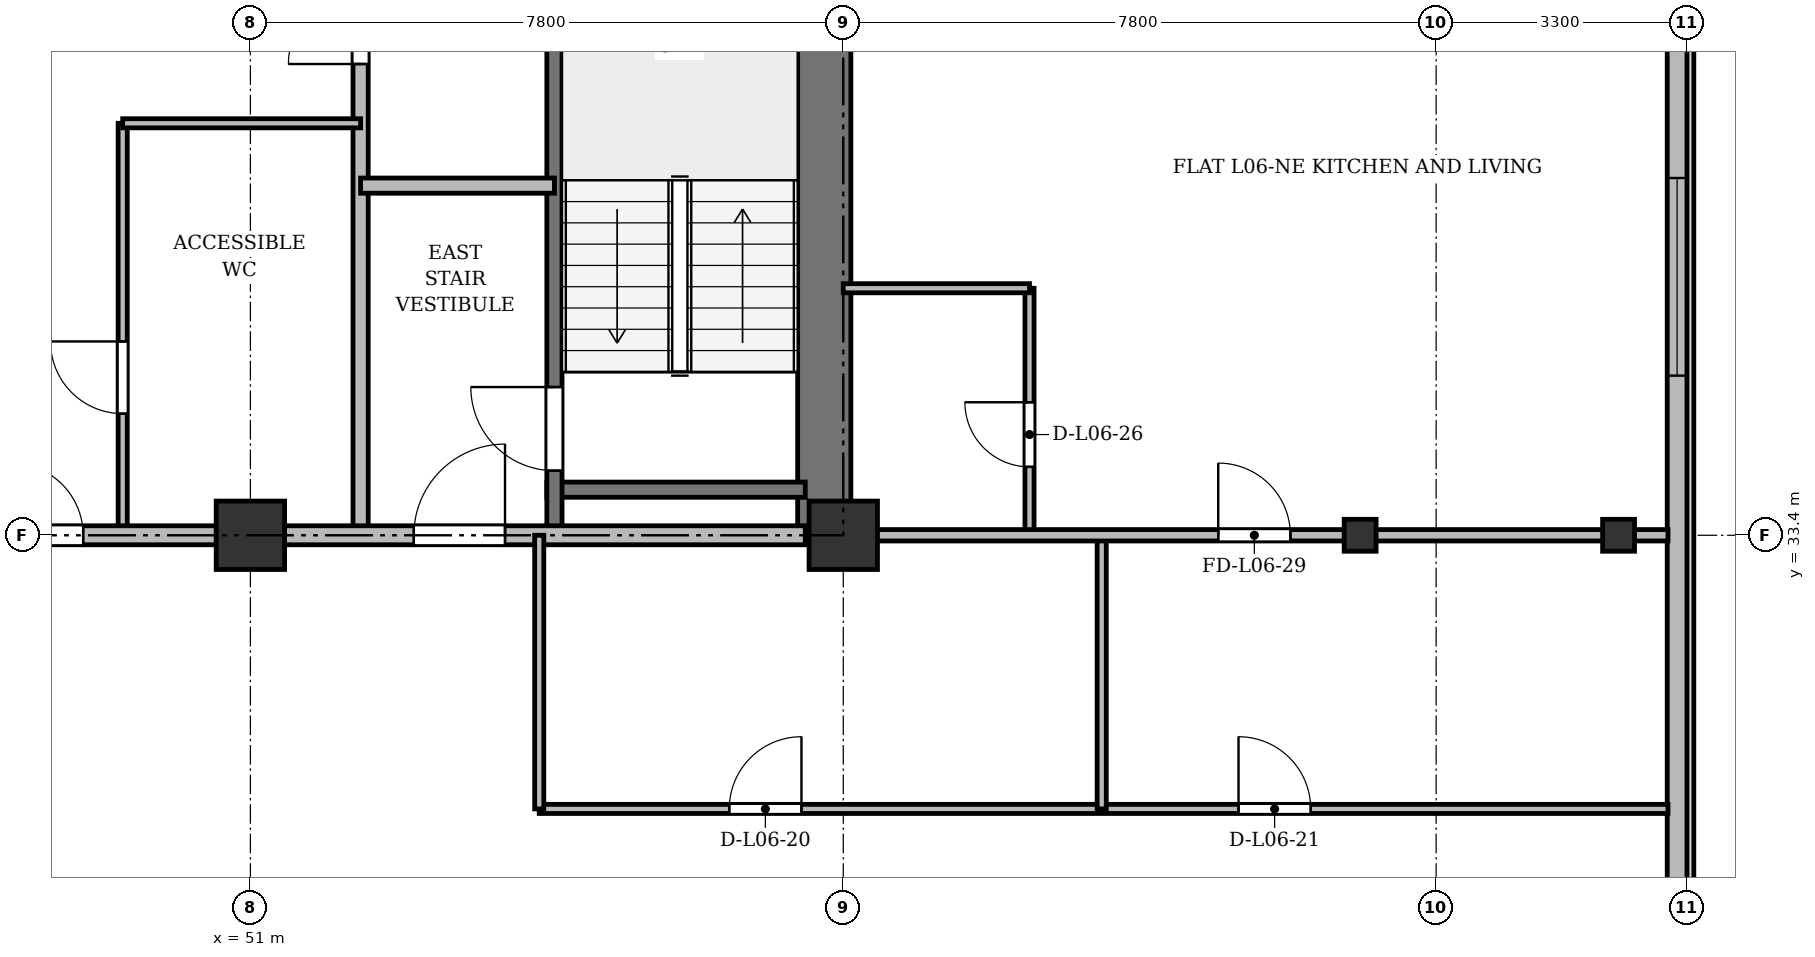
"""IFC4 building model, lengths in metres.
Left out: names, types, materials, properties, quantities, classifications, styles, units other than length and angle.
Written with IfcOpenShell. Run it as: python <this file> out.ifc"""

import sys

from ifc_helpers import new_model, si_unit, direction, frame, frame_2d, origin, origin_2d, place, context, subcontext, project, spatial, rectangle, i_section, extrude, source, transform, mapped, element, fill, save


model = new_model("IFC4")
c1 = context("Model", 3, precision=1e-05, world=origin(), true_north=direction((0.0, 1.0)))
c2 = subcontext(c1, "Body", "Model", "MODEL_VIEW")
j1 = project(units=[si_unit("LENGTHUNIT", "METRE"), si_unit("PLANEANGLEUNIT", "RADIAN")], contexts=[c1])
p1 = place(None, origin())
s1 = spatial("IfcSite", under=j1, at=p1, CompositionType="ELEMENT")
p2 = place(p1, origin())
s2 = spatial("IfcBuilding", under=s1, at=p2, CompositionType="ELEMENT")
p3 = place(p2, frame((0.0, 0.0, 27.1)))
s3 = spatial("IfcBuildingStorey", under=s2, at=p3, CompositionType="ELEMENT", Elevation=27.1)
m1 = source(origin(), c2, "Body", "SweptSolid", [
    extrude(rectangle(XDim=0.9, YDim=0.9, at=origin_2d()), origin(), (0.0, 0.0, 1.0), 3.6),
])
for number, where, z_axis, x_axis in (
    (1, (51.0, 33.4, 0.0), (0.0, 0.0, 1.0), (1.0, 0.0, 0.0)),
    (2, (58.8, 33.4, 0.0), (0.0, 0.0, 1.0), (1.0, 0.0, 0.0)),
):
    element("IfcColumn", number, at=place(p3, frame(where, z_axis=z_axis, x_axis=x_axis)), inside=s3, PredefinedType="COLUMN", context=c2, shape_type="MappedRepresentation", body=[
        mapped(m1, transform((0.0, 0.0, 0.0), x_axis=(1.0, 0.0, 0.0), y_axis=(0.0, 1.0, 0.0), z_axis=(0.0, 0.0, 1.0), scale=1.0)),
    ])
m2 = source(origin(), c2, "Body", "SweptSolid", [
    extrude(i_section(OverallWidth=0.42, OverallDepth=0.42, WebThickness=0.026, FlangeThickness=0.04, at=origin_2d()), origin(), (0.0, 0.0, 1.0), 3.6),
])
for number, where, z_axis, x_axis in (
    (3, (65.6, 33.4, 0.0), (0.0, 0.0, 1.0), (1.0, 0.0, 0.0)),
    (4, (69.0, 33.4, 0.0), (0.0, 0.0, 1.0), (1.0, 0.0, 0.0)),
):
    element("IfcColumn", number, at=place(p3, frame(where, z_axis=z_axis, x_axis=x_axis)), inside=s3, PredefinedType="COLUMN", context=c2, shape_type="MappedRepresentation", body=[
        mapped(m2, transform((0.0, 0.0, 0.0), x_axis=(1.0, 0.0, 0.0), y_axis=(0.0, 1.0, 0.0), z_axis=(0.0, 0.0, 1.0), scale=1.0)),
    ])
p4 = place(p3, frame((69.77, 45.5, 0.0), z_axis=(0.0, 0.0, 1.0), x_axis=(0.0, -1.0, 0.0)))
e5 = element("IfcWall", 5, at=p4, inside=s3, PredefinedType="SOLIDWALL", context=c2, shape_type="SweptSolid", body=[
    extrude(rectangle(XDim=39.6, YDim=0.26, at=frame_2d((19.8, 0.0))), origin(), (0.0, 0.0, 1.0), 3.34),
])
p5 = place(p4, frame((36.95, 0.0, 0.92)))
e6 = element("IfcOpeningElement", 6, at=p5, cuts=e5, PredefinedType="OPENING", context=c2, shape_type="SweptSolid", body=[
    extrude(rectangle(XDim=1.2, YDim=1.65, at=frame_2d((0.6, 0.825))), frame((0.0, 0.14, 0.0), z_axis=(0.0, -1.0, 0.0), x_axis=(1.0, 0.0, 0.0)), (0.0, 0.0, 1.0), 0.28),
])
p6 = place(p4, frame((32.8, 0.0, 0.92)))
e7 = element("IfcOpeningElement", 7, at=p6, cuts=e5, PredefinedType="OPENING", context=c2, shape_type="SweptSolid", body=[
    extrude(rectangle(XDim=2.6, YDim=1.9, at=frame_2d((1.3, 0.95))), frame((0.0, 0.14, 0.0), z_axis=(0.0, -1.0, 0.0), x_axis=(1.0, 0.0, 0.0)), (0.0, 0.0, 1.0), 0.28),
])
p7 = place(p4, frame((28.6, 0.0, 0.92)))
e8 = element("IfcOpeningElement", 8, at=p7, cuts=e5, PredefinedType="OPENING", context=c2, shape_type="SweptSolid", body=[
    extrude(rectangle(XDim=2.6, YDim=1.9, at=frame_2d((1.3, 0.95))), frame((0.0, 0.14, 0.0), z_axis=(0.0, -1.0, 0.0), x_axis=(1.0, 0.0, 0.0)), (0.0, 0.0, 1.0), 0.28),
])
p8 = place(p4, frame((7.4, 0.0, 0.92)))
e9 = element("IfcOpeningElement", 9, at=p8, cuts=e5, PredefinedType="OPENING", context=c2, shape_type="SweptSolid", body=[
    extrude(rectangle(XDim=2.6, YDim=1.9, at=frame_2d((1.3, 0.95))), frame((0.0, 0.14, 0.0), z_axis=(0.0, -1.0, 0.0), x_axis=(1.0, 0.0, 0.0)), (0.0, 0.0, 1.0), 0.28),
])
p9 = place(p4, frame((4.5, 0.0, 0.92)))
e10 = element("IfcOpeningElement", 10, at=p9, cuts=e5, PredefinedType="OPENING", context=c2, shape_type="SweptSolid", body=[
    extrude(rectangle(XDim=1.2, YDim=1.65, at=frame_2d((0.6, 0.825))), frame((0.0, 0.14, 0.0), z_axis=(0.0, -1.0, 0.0), x_axis=(1.0, 0.0, 0.0)), (0.0, 0.0, 1.0), 0.28),
])
p10 = place(p4, frame((1.15, 0.0, 0.92)))
e11 = element("IfcOpeningElement", 11, at=p10, cuts=e5, PredefinedType="OPENING", context=c2, shape_type="SweptSolid", body=[
    extrude(rectangle(XDim=1.2, YDim=1.65, at=frame_2d((0.6, 0.825))), frame((0.0, 0.14, 0.0), z_axis=(0.0, -1.0, 0.0), x_axis=(1.0, 0.0, 0.0)), (0.0, 0.0, 1.0), 0.28),
])
p11 = place(p3, frame((58.55, 33.4, 0.0), z_axis=(0.0, 0.0, 1.0), x_axis=(0.0, 1.0, 0.0)))
e12 = element("IfcWall", 12, at=p11, inside=s3, PredefinedType="SHEAR", context=c2, shape_type="SweptSolid", body=[
    extrude(rectangle(XDim=11.7, YDim=0.7, at=frame_2d((5.85, 0.0))), origin(), (0.0, 0.0, 1.0), 3.34),
])
p12 = place(p3, frame((54.9, 34.0, 0.0), z_axis=(0.0, 0.0, 1.0), x_axis=(1.0, 0.0, 0.0)))
e13 = element("IfcWall", 13, at=p12, inside=s3, PredefinedType="SHEAR", context=c2, shape_type="SweptSolid", body=[
    extrude(rectangle(XDim=3.4, YDim=0.2, at=frame_2d((1.7, 0.0))), origin(), (0.0, 0.0, 1.0), 3.34),
])
p13 = place(p3, frame((55.0, 33.4, 0.0), z_axis=(0.0, 0.0, 1.0), x_axis=(0.0, 1.0, 0.0)))
e14 = element("IfcWall", 14, at=p13, inside=s3, PredefinedType="SHEAR", context=c2, shape_type="SweptSolid", body=[
    extrude(rectangle(XDim=11.1, YDim=0.2, at=frame_2d((5.55, 0.0))), origin(), (0.0, 0.0, 1.0), 3.34),
])
p14 = place(p13, frame((0.85, 0.0, 0.0)))
e15 = element("IfcOpeningElement", 15, at=p14, cuts=e14, PredefinedType="OPENING", context=c2, shape_type="SweptSolid", body=[
    extrude(rectangle(XDim=1.1, YDim=2.15, at=frame_2d((0.55, 1.075))), frame((0.0, 0.11, 0.0), z_axis=(0.0, -1.0, 0.0), x_axis=(1.0, 0.0, 0.0)), (0.0, 0.0, 1.0), 0.22),
])
p15 = place(p3, frame((52.45, 33.4, 0.0), z_axis=(0.0, 0.0, 1.0), x_axis=(0.0, 1.0, 0.0)))
e16 = element("IfcWall", 16, at=p15, inside=s3, PredefinedType="PARTITIONING", context=c2, shape_type="SweptSolid", body=[
    extrude(rectangle(XDim=8.65, YDim=0.2, at=frame_2d((4.325, 0.0))), origin(), (0.0, 0.0, 1.0), 2.69),
])
p16 = place(p15, frame((6.2, 0.0, 0.0)))
e17 = element("IfcOpeningElement", 17, at=p16, cuts=e16, PredefinedType="OPENING", context=c2, shape_type="SweptSolid", body=[
    extrude(rectangle(XDim=0.95, YDim=2.15, at=frame_2d((0.475, 1.075))), frame((0.0, 0.11, 0.0), z_axis=(0.0, -1.0, 0.0), x_axis=(1.0, 0.0, 0.0)), (0.0, 0.0, 1.0), 0.22),
])
p17 = place(p3, frame((52.45, 38.0, 0.0), z_axis=(0.0, 0.0, 1.0), x_axis=(1.0, 0.0, 0.0)))
e18 = element("IfcWall", 18, at=p17, inside=s3, PredefinedType="PARTITIONING", context=c2, shape_type="SweptSolid", body=[
    extrude(rectangle(XDim=2.55, YDim=0.2, at=frame_2d((1.275, 0.0))), origin(), (0.0, 0.0, 1.0), 3.34),
])
p18 = place(p3, frame((49.32, 33.4, 0.0), z_axis=(0.0, 0.0, 1.0), x_axis=(0.0, 1.0, 0.0)))
e19 = element("IfcWall", 19, at=p18, inside=s3, PredefinedType="PARTITIONING", context=c2, shape_type="SweptSolid", body=[
    extrude(rectangle(XDim=5.42, YDim=0.12, at=frame_2d((2.71, 0.0))), origin(), (0.0, 0.0, 1.0), 2.69),
])
p19 = place(p18, frame((1.6, 0.0, 0.0)))
e20 = element("IfcOpeningElement", 20, at=p19, cuts=e19, PredefinedType="OPENING", context=c2, shape_type="SweptSolid", body=[
    extrude(rectangle(XDim=0.95, YDim=2.15, at=frame_2d((0.475, 1.075))), frame((0.0, 0.07, 0.0), z_axis=(0.0, -1.0, 0.0), x_axis=(1.0, 0.0, 0.0)), (0.0, 0.0, 1.0), 0.14),
])
p20 = place(p3, frame((49.32, 38.82, 0.0), z_axis=(0.0, 0.0, 1.0), x_axis=(1.0, 0.0, 0.0)))
e21 = element("IfcWall", 21, at=p20, inside=s3, PredefinedType="PARTITIONING", context=c2, shape_type="SweptSolid", body=[
    extrude(rectangle(XDim=3.13, YDim=0.12, at=frame_2d((1.565, 0.0))), origin(), (0.0, 0.0, 1.0), 2.752),
])
p21 = place(p3, frame((47.15, 33.4, 0.0), z_axis=(0.0, 0.0, 1.0), x_axis=(1.0, 0.0, 0.0)))
e22 = element("IfcWall", 22, at=p21, inside=s3, PredefinedType="PARTITIONING", context=c2, shape_type="SweptSolid", body=[
    extrude(rectangle(XDim=11.15, YDim=0.25, at=frame_2d((5.575, 0.0))), origin(), (0.0, 0.0, 1.0), 2.69),
])
p22 = place(p21, frame((0.7, 0.0, 0.0)))
e23 = element("IfcOpeningElement", 23, at=p22, cuts=e22, PredefinedType="OPENING", context=c2, shape_type="SweptSolid", body=[
    extrude(rectangle(XDim=0.95, YDim=2.15, at=frame_2d((0.475, 1.075))), frame((0.0, 0.135, 0.0), z_axis=(0.0, -1.0, 0.0), x_axis=(1.0, 0.0, 0.0)), (0.0, 0.0, 1.0), 0.27),
])
p23 = place(p21, frame((6.0, 0.0, 0.0)))
e24 = element("IfcOpeningElement", 24, at=p23, cuts=e22, PredefinedType="OPENING", context=c2, shape_type="SweptSolid", body=[
    extrude(rectangle(XDim=1.2, YDim=2.15, at=frame_2d((0.6, 1.075))), frame((0.0, 0.135, 0.0), z_axis=(0.0, -1.0, 0.0), x_axis=(1.0, 0.0, 0.0)), (0.0, 0.0, 1.0), 0.27),
])
p24 = place(p3, frame((54.8, 29.8, 0.0), z_axis=(0.0, 0.0, 1.0), x_axis=(1.0, 0.0, 0.0)))
e25 = element("IfcWall", 25, at=p24, inside=s3, PredefinedType="PARTITIONING", context=c2, shape_type="SweptSolid", body=[
    extrude(rectangle(XDim=14.85, YDim=0.12, at=frame_2d((7.425, 0.0))), origin(), (0.0, 0.0, 1.0), 2.752),
])
p25 = place(p24, frame((2.5, 0.0, 0.0)))
e26 = element("IfcOpeningElement", 26, at=p25, cuts=e25, PredefinedType="OPENING", context=c2, shape_type="SweptSolid", body=[
    extrude(rectangle(XDim=0.95, YDim=2.15, at=frame_2d((0.475, 1.075))), frame((0.0, 0.07, 0.0), z_axis=(0.0, -1.0, 0.0), x_axis=(1.0, 0.0, 0.0)), (0.0, 0.0, 1.0), 0.14),
])
p26 = place(p24, frame((9.2, 0.0, 0.0)))
e27 = element("IfcOpeningElement", 27, at=p26, cuts=e25, PredefinedType="OPENING", context=c2, shape_type="SweptSolid", body=[
    extrude(rectangle(XDim=0.95, YDim=2.15, at=frame_2d((0.475, 1.075))), frame((0.0, 0.07, 0.0), z_axis=(0.0, -1.0, 0.0), x_axis=(1.0, 0.0, 0.0)), (0.0, 0.0, 1.0), 0.14),
])
for number, where, z_axis, x_axis in (
    (28, (62.2, 29.8, 0.0), (0.0, 0.0, 1.0), (0.0, 1.0, 0.0)),
    (29, (54.8, 29.8, 0.0), (0.0, 0.0, 1.0), (0.0, 1.0, 0.0)),
):
    element("IfcWall", number, at=place(p3, frame(where, z_axis=z_axis, x_axis=x_axis)), inside=s3, PredefinedType="PARTITIONING", context=c2, shape_type="SweptSolid", body=[
        extrude(rectangle(XDim=3.6, YDim=0.12, at=frame_2d((1.8, 0.0))), origin(), (0.0, 0.0, 1.0), 2.69),
    ])
p27 = place(p3, frame((61.25, 33.4, 0.0), z_axis=(0.0, 0.0, 1.0), x_axis=(0.0, 1.0, 0.0)))
e30 = element("IfcWall", 30, at=p27, inside=s3, PredefinedType="PARTITIONING", context=c2, shape_type="SweptSolid", body=[
    extrude(rectangle(XDim=3.25, YDim=0.12, at=frame_2d((1.625, 0.0))), origin(), (0.0, 0.0, 1.0), 2.69),
])
p28 = place(p27, frame((0.9, 0.0, 0.0)))
e31 = element("IfcOpeningElement", 31, at=p28, cuts=e30, PredefinedType="OPENING", context=c2, shape_type="SweptSolid", body=[
    extrude(rectangle(XDim=0.85, YDim=2.1, at=frame_2d((0.425, 1.05))), frame((0.0, 0.07, 0.0), z_axis=(0.0, -1.0, 0.0), x_axis=(1.0, 0.0, 0.0)), (0.0, 0.0, 1.0), 0.14),
])
p29 = place(p3, frame((58.8, 36.65, 0.0), z_axis=(0.0, 0.0, 1.0), x_axis=(1.0, 0.0, 0.0)))
e32 = element("IfcWall", 32, at=p29, inside=s3, PredefinedType="PARTITIONING", context=c2, shape_type="SweptSolid", body=[
    extrude(rectangle(XDim=2.45, YDim=0.12, at=frame_2d((1.225, 0.0))), origin(), (0.0, 0.0, 1.0), 2.752),
])
p30 = place(p3, frame((58.8, 33.4, 0.0), z_axis=(0.0, 0.0, 1.0), x_axis=(1.0, 0.0, 0.0)))
e33 = element("IfcWall", 33, at=p30, inside=s3, PredefinedType="PARTITIONING", context=c2, shape_type="SweptSolid", body=[
    extrude(rectangle(XDim=10.85, YDim=0.15, at=frame_2d((5.425, 0.0))), origin(), (0.0, 0.0, 1.0), 2.69),
])
p31 = place(p30, frame((4.933, 0.0, 0.0)))
e34 = element("IfcOpeningElement", 34, at=p31, cuts=e33, PredefinedType="OPENING", context=c2, shape_type="SweptSolid", body=[
    extrude(rectangle(XDim=0.95, YDim=2.15, at=frame_2d((0.475, 1.075))), frame((0.0, 0.085, 0.0), z_axis=(0.0, -1.0, 0.0), x_axis=(1.0, 0.0, 0.0)), (0.0, 0.0, 1.0), 0.17),
])
m3 = source(origin(), c2, "Body", "SweptSolid", [
    extrude(rectangle(XDim=2.6, YDim=1.9, at=frame_2d((1.3, 0.95))), frame((0.0, 0.03, 0.0), z_axis=(0.0, -1.0, 0.0), x_axis=(1.0, 0.0, 0.0)), (0.0, 0.0, 1.0), 0.06),
])
p32 = place(p8, origin())
e35 = element("IfcWindow", 35, at=p32, inside=s3, PartitioningType="SINGLE_PANEL", PredefinedType="WINDOW", context=c2, shape_type="MappedRepresentation", body=[
    mapped(m3, transform((0.0, 0.0, 0.0), x_axis=(1.0, 0.0, 0.0), y_axis=(0.0, 1.0, 0.0), z_axis=(0.0, 0.0, 1.0), scale=1.0)),
])
fill(e9, e35)
m4 = source(origin(), c2, "Body", "SweptSolid", [
    extrude(rectangle(XDim=1.1, YDim=2.15, at=frame_2d((0.55, 1.075))), frame((0.0, 0.025, 0.0), z_axis=(0.0, -1.0, 0.0), x_axis=(1.0, 0.0, 0.0)), (0.0, 0.0, 1.0), 0.05),
])
p33 = place(p14, origin())
e36 = element("IfcDoor", 36, at=p33, inside=s3, OperationType="SINGLE_SWING_RIGHT", PredefinedType="DOOR", context=c2, shape_type="MappedRepresentation", body=[
    mapped(m4, transform((0.0, 0.0, 0.0), x_axis=(1.0, 0.0, 0.0), y_axis=(0.0, 1.0, 0.0), z_axis=(0.0, 0.0, 1.0), scale=1.0)),
])
fill(e15, e36)
m5 = source(origin(), c2, "Body", "SweptSolid", [
    extrude(rectangle(XDim=0.95, YDim=2.15, at=frame_2d((0.475, 1.075))), frame((0.0, 0.025, 0.0), z_axis=(0.0, -1.0, 0.0), x_axis=(1.0, 0.0, 0.0)), (0.0, 0.0, 1.0), 0.05),
])
p34 = place(p16, origin())
e37 = element("IfcDoor", 37, at=p34, inside=s3, OperationType="SINGLE_SWING_LEFT", PredefinedType="DOOR", context=c2, shape_type="MappedRepresentation", body=[
    mapped(m5, transform((0.0, 0.0, 0.0), x_axis=(1.0, 0.0, 0.0), y_axis=(0.0, 1.0, 0.0), z_axis=(0.0, 0.0, 1.0), scale=1.0)),
])
fill(e17, e37)
p35 = place(p19, origin())
e38 = element("IfcDoor", 38, at=p35, inside=s3, OperationType="SINGLE_SWING_RIGHT", PredefinedType="DOOR", context=c2, shape_type="MappedRepresentation", body=[
    mapped(m5, transform((0.0, 0.0, 0.0), x_axis=(1.0, 0.0, 0.0), y_axis=(0.0, 1.0, 0.0), z_axis=(0.0, 0.0, 1.0), scale=1.0)),
])
fill(e20, e38)
p36 = place(p22, origin())
e39 = element("IfcDoor", 39, at=p36, inside=s3, OperationType="SINGLE_SWING_LEFT", PredefinedType="DOOR", context=c2, shape_type="MappedRepresentation", body=[
    mapped(m5, transform((0.0, 0.0, 0.0), x_axis=(1.0, 0.0, 0.0), y_axis=(0.0, 1.0, 0.0), z_axis=(0.0, 0.0, 1.0), scale=1.0)),
])
fill(e23, e39)
m6 = source(origin(), c2, "Body", "SweptSolid", [
    extrude(rectangle(XDim=1.2, YDim=2.15, at=frame_2d((0.6, 1.075))), frame((0.0, 0.025, 0.0), z_axis=(0.0, -1.0, 0.0), x_axis=(1.0, 0.0, 0.0)), (0.0, 0.0, 1.0), 0.05),
])
p37 = place(p23, origin())
e40 = element("IfcDoor", 40, at=p37, inside=s3, OperationType="SINGLE_SWING_RIGHT", PredefinedType="DOOR", context=c2, shape_type="MappedRepresentation", body=[
    mapped(m6, transform((0.0, 0.0, 0.0), x_axis=(1.0, 0.0, 0.0), y_axis=(0.0, 1.0, 0.0), z_axis=(0.0, 0.0, 1.0), scale=1.0)),
])
fill(e24, e40)
p38 = place(p25, origin())
e41 = element("IfcDoor", 41, at=p38, inside=s3, OperationType="SINGLE_SWING_RIGHT", PredefinedType="DOOR", context=c2, shape_type="MappedRepresentation", body=[
    mapped(m5, transform((0.0, 0.0, 0.0), x_axis=(1.0, 0.0, 0.0), y_axis=(0.0, 1.0, 0.0), z_axis=(0.0, 0.0, 1.0), scale=1.0)),
])
fill(e26, e41)
p39 = place(p26, origin())
e42 = element("IfcDoor", 42, at=p39, inside=s3, OperationType="SINGLE_SWING_LEFT", PredefinedType="DOOR", context=c2, shape_type="MappedRepresentation", body=[
    mapped(m5, transform((0.0, 0.0, 0.0), x_axis=(1.0, 0.0, 0.0), y_axis=(0.0, 1.0, 0.0), z_axis=(0.0, 0.0, 1.0), scale=1.0)),
])
fill(e27, e42)
m7 = source(origin(), c2, "Body", "SweptSolid", [
    extrude(rectangle(XDim=0.85, YDim=2.1, at=frame_2d((0.425, 1.05))), frame((0.0, 0.025, 0.0), z_axis=(0.0, -1.0, 0.0), x_axis=(1.0, 0.0, 0.0)), (0.0, 0.0, 1.0), 0.05),
])
p40 = place(p28, origin())
e43 = element("IfcDoor", 43, at=p40, inside=s3, OperationType="SINGLE_SWING_RIGHT", PredefinedType="DOOR", context=c2, shape_type="MappedRepresentation", body=[
    mapped(m7, transform((0.0, 0.0, 0.0), x_axis=(1.0, 0.0, 0.0), y_axis=(0.0, 1.0, 0.0), z_axis=(0.0, 0.0, 1.0), scale=1.0)),
])
fill(e31, e43)
p41 = place(p31, origin())
e44 = element("IfcDoor", 44, at=p41, inside=s3, OperationType="SINGLE_SWING_LEFT", PredefinedType="DOOR", context=c2, shape_type="MappedRepresentation", body=[
    mapped(m5, transform((0.0, 0.0, 0.0), x_axis=(1.0, 0.0, 0.0), y_axis=(0.0, 1.0, 0.0), z_axis=(0.0, 0.0, 1.0), scale=1.0)),
])
fill(e34, e44)
save(model, sys.argv[1])
